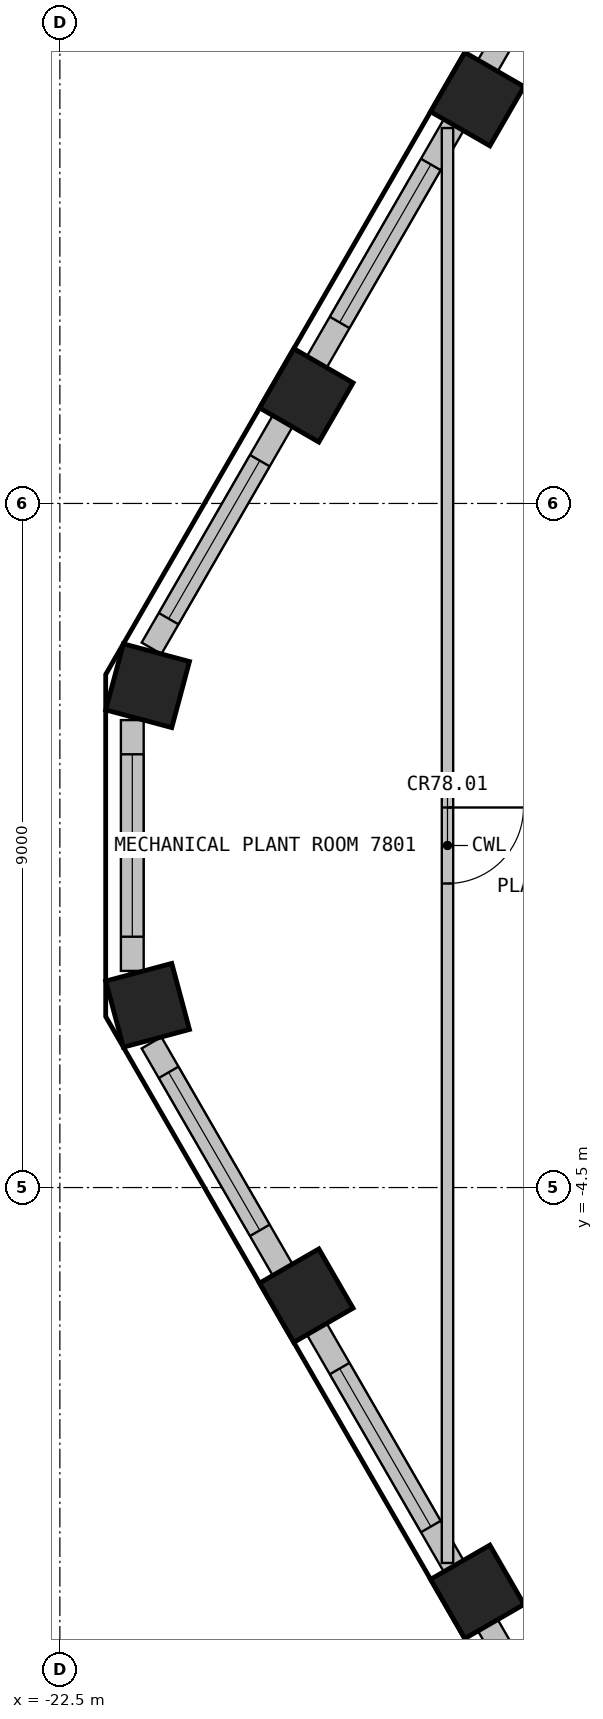
"""IFC4 building model, lengths in metres.
Left out: names, types, materials, properties, quantities, classifications, styles, units other than length and angle.
Written with IfcOpenShell. Run it as: python <this file> out.ifc"""

import sys

from ifc_helpers import new_model, si_unit, direction, frame, frame_2d, origin, origin_2d, place, context, subcontext, project, spatial, rectangle, extrude, element, fill, save


model = new_model("IFC4")
c1 = context("Model", 3, precision=1e-05, world=origin(), true_north=direction((0.0, 1.0)))
c2 = subcontext(c1, "Body", "Model", "MODEL_VIEW")
j1 = project(units=[si_unit("LENGTHUNIT", "METRE"), si_unit("PLANEANGLEUNIT", "RADIAN")], contexts=[c1])
p1 = place(None, origin())
s1 = spatial("IfcSite", under=j1, at=p1, CompositionType="ELEMENT")
p2 = place(p1, origin())
s2 = spatial("IfcBuilding", under=s1, at=p2, CompositionType="ELEMENT")
p3 = place(p2, frame((0.0, 0.0, 318.9)))
s3 = spatial("IfcBuildingStorey", under=s2, at=p3, CompositionType="ELEMENT", Elevation=318.9)
for number, where, z_axis, x_axis in (
    (1, (-17.007, 9.819, 0.0), (0.0, 0.0, 1.0), (-0.5, -0.866, 0.0)),
    (2, (-19.257, 5.922, 0.0), (0.0, 0.0, 1.0), (-0.5, -0.866, 0.0)),
    (3, (-21.346, 2.102, 0.0), (0.0, 0.0, 1.0), (-0.259, -0.966, 0.0)),
    (4, (-21.346, -2.102, 0.0), (0.0, 0.0, 1.0), (0.259, -0.966, 0.0)),
    (5, (-19.257, -5.922, 0.0), (0.0, 0.0, 1.0), (0.5, -0.866, 0.0)),
    (6, (-17.007, -9.819, 0.0), (0.0, 0.0, 1.0), (0.5, -0.866, 0.0)),
):
    element("IfcColumn", number, at=place(p3, frame(where, z_axis=z_axis, x_axis=x_axis)), inside=s3, PredefinedType="COLUMN", context=c2, shape_type="SweptSolid", body=[
        extrude(rectangle(XDim=0.9, YDim=0.9, at=origin_2d()), origin(), (0.0, 0.0, 1.0), 3.6),
    ])
p4 = place(p3, frame((-15.144, 13.247, 0.0), z_axis=(0.0, 0.0, 1.0), x_axis=(-0.500059425018, -0.865991092016, 0.0)))
e7 = element("IfcWall", 7, at=p4, inside=s3, PredefinedType="SOLIDWALL", context=c2, shape_type="SweptSolid", body=[
    extrude(rectangle(XDim=3.449, YDim=0.3, at=frame_2d((1.725, 0.0))), origin(), (0.0, 0.0, 1.0), 4.05),
])
p5 = place(p4, frame((0.45, 0.0, 0.6)))
e8 = element("IfcOpeningElement", 8, at=p5, cuts=e7, PredefinedType="OPENING", context=c2, shape_type="SweptSolid", body=[
    extrude(rectangle(XDim=2.4, YDim=2.3, at=frame_2d((1.2, 1.15))), frame((0.0, 0.16, 0.0), z_axis=(0.0, -1.0, 0.0), x_axis=(1.0, 0.0, 0.0)), (0.0, 0.0, 1.0), 0.32),
])
p6 = place(p3, frame((-17.319, 9.479, 0.0), z_axis=(0.0, 0.0, 1.0), x_axis=(-0.500027802648, -0.866009351323, 0.0)))
e9 = element("IfcWall", 9, at=p6, inside=s3, PredefinedType="SOLIDWALL", context=c2, shape_type="SweptSolid", body=[
    extrude(rectangle(XDim=3.599, YDim=0.3, at=frame_2d((1.799, 0.0))), origin(), (0.0, 0.0, 1.0), 4.05),
])
p7 = place(p6, frame((0.6, 0.0, 0.6)))
e10 = element("IfcOpeningElement", 10, at=p7, cuts=e9, PredefinedType="OPENING", context=c2, shape_type="SweptSolid", body=[
    extrude(rectangle(XDim=2.4, YDim=2.3, at=frame_2d((1.2, 1.15))), frame((0.0, 0.16, 0.0), z_axis=(0.0, -1.0, 0.0), x_axis=(1.0, 0.0, 0.0)), (0.0, 0.0, 1.0), 0.32),
])
p8 = place(p3, frame((-19.569, 5.582, 0.0), z_axis=(0.0, 0.0, 1.0), x_axis=(-0.499975693202, -0.866039436866, 0.0)))
e11 = element("IfcWall", 11, at=p8, inside=s3, PredefinedType="SOLIDWALL", context=c2, shape_type="SweptSolid", body=[
    extrude(rectangle(XDim=3.449, YDim=0.3, at=frame_2d((1.725, 0.0))), origin(), (0.0, 0.0, 1.0), 4.05),
])
p9 = place(p8, frame((0.6, 0.0, 0.6)))
e12 = element("IfcOpeningElement", 12, at=p9, cuts=e11, PredefinedType="OPENING", context=c2, shape_type="SweptSolid", body=[
    extrude(rectangle(XDim=2.4, YDim=2.3, at=frame_2d((1.2, 1.15))), frame((0.0, 0.16, 0.0), z_axis=(0.0, -1.0, 0.0), x_axis=(1.0, 0.0, 0.0)), (0.0, 0.0, 1.0), 0.32),
])
p10 = place(p3, frame((-21.547, 1.65, 0.0), z_axis=(0.0, 0.0, 1.0), x_axis=(0.0, -1.0, 0.0)))
e13 = element("IfcWall", 13, at=p10, inside=s3, PredefinedType="SOLIDWALL", context=c2, shape_type="SweptSolid", body=[
    extrude(rectangle(XDim=3.3, YDim=0.3, at=frame_2d((1.65, 0.0))), origin(), (0.0, 0.0, 1.0), 4.05),
])
p11 = place(p10, frame((0.45, 0.0, 0.6)))
e14 = element("IfcOpeningElement", 14, at=p11, cuts=e13, PredefinedType="OPENING", context=c2, shape_type="SweptSolid", body=[
    extrude(rectangle(XDim=2.4, YDim=2.3, at=frame_2d((1.2, 1.15))), frame((0.0, 0.16, 0.0), z_axis=(0.0, -1.0, 0.0), x_axis=(1.0, 0.0, 0.0)), (0.0, 0.0, 1.0), 0.32),
])
p12 = place(p3, frame((-21.294, -2.595, 0.0), z_axis=(0.0, 0.0, 1.0), x_axis=(0.499975693202, -0.866039436866, 0.0)))
e15 = element("IfcWall", 15, at=p12, inside=s3, PredefinedType="SOLIDWALL", context=c2, shape_type="SweptSolid", body=[
    extrude(rectangle(XDim=3.449, YDim=0.3, at=frame_2d((1.725, 0.0))), origin(), (0.0, 0.0, 1.0), 4.05),
])
p13 = place(p12, frame((0.45, 0.0, 0.6)))
e16 = element("IfcOpeningElement", 16, at=p13, cuts=e15, PredefinedType="OPENING", context=c2, shape_type="SweptSolid", body=[
    extrude(rectangle(XDim=2.4, YDim=2.3, at=frame_2d((1.2, 1.15))), frame((0.0, 0.16, 0.0), z_axis=(0.0, -1.0, 0.0), x_axis=(1.0, 0.0, 0.0)), (0.0, 0.0, 1.0), 0.32),
])
p14 = place(p3, frame((-19.119, -6.362, 0.0), z_axis=(0.0, 0.0, 1.0), x_axis=(0.500027802648, -0.866009351323, 0.0)))
e17 = element("IfcWall", 17, at=p14, inside=s3, PredefinedType="SOLIDWALL", context=c2, shape_type="SweptSolid", body=[
    extrude(rectangle(XDim=3.599, YDim=0.3, at=frame_2d((1.799, 0.0))), origin(), (0.0, 0.0, 1.0), 4.05),
])
p15 = place(p14, frame((0.6, 0.0, 0.6)))
e18 = element("IfcOpeningElement", 18, at=p15, cuts=e17, PredefinedType="OPENING", context=c2, shape_type="SweptSolid", body=[
    extrude(rectangle(XDim=2.4, YDim=2.3, at=frame_2d((1.2, 1.15))), frame((0.0, 0.16, 0.0), z_axis=(0.0, -1.0, 0.0), x_axis=(1.0, 0.0, 0.0)), (0.0, 0.0, 1.0), 0.32),
])
p16 = place(p3, frame((-16.869, -10.26, 0.0), z_axis=(0.0, 0.0, 1.0), x_axis=(0.500059425018, -0.865991092016, 0.0)))
e19 = element("IfcWall", 19, at=p16, inside=s3, PredefinedType="SOLIDWALL", context=c2, shape_type="SweptSolid", body=[
    extrude(rectangle(XDim=3.449, YDim=0.3, at=frame_2d((1.725, 0.0))), origin(), (0.0, 0.0, 1.0), 4.05),
])
p17 = place(p16, frame((0.6, 0.0, 0.6)))
e20 = element("IfcOpeningElement", 20, at=p17, cuts=e19, PredefinedType="OPENING", context=c2, shape_type="SweptSolid", body=[
    extrude(rectangle(XDim=2.4, YDim=2.3, at=frame_2d((1.2, 1.15))), frame((0.0, 0.16, 0.0), z_axis=(0.0, -1.0, 0.0), x_axis=(1.0, 0.0, 0.0)), (0.0, 0.0, 1.0), 0.32),
])
p18 = place(p3, frame((-17.4, 9.439, 0.0), z_axis=(0.0, 0.0, 1.0), x_axis=(0.0, -1.0, 0.0)))
e21 = element("IfcWall", 21, at=p18, inside=s3, PredefinedType="PARTITIONING", context=c2, shape_type="SweptSolid", body=[
    extrude(rectangle(XDim=18.878, YDim=0.15, at=frame_2d((9.439, 0.0))), origin(), (0.0, 0.0, 1.0), 3.6),
])
p19 = place(p18, frame((8.939, 0.0, 0.0)))
e22 = element("IfcOpeningElement", 22, at=p19, cuts=e21, PredefinedType="OPENING", context=c2, shape_type="SweptSolid", body=[
    extrude(rectangle(XDim=1.0, YDim=2.1, at=frame_2d((0.5, 1.05))), frame((0.0, 0.085, 0.0), z_axis=(0.0, -1.0, 0.0), x_axis=(1.0, 0.0, 0.0)), (0.0, 0.0, 1.0), 0.17),
])
p20 = place(p7, origin())
e23 = element("IfcWindow", 23, at=p20, inside=s3, PartitioningType="SINGLE_PANEL", PredefinedType="WINDOW", context=c2, shape_type="SweptSolid", body=[
    extrude(rectangle(XDim=2.4, YDim=2.3, at=frame_2d((1.2, 1.15))), frame((0.0, 0.03, 0.0), z_axis=(0.0, -1.0, 0.0), x_axis=(1.0, 0.0, 0.0)), (0.0, 0.0, 1.0), 0.06),
])
fill(e10, e23)
p21 = place(p9, origin())
e24 = element("IfcWindow", 24, at=p21, inside=s3, PartitioningType="SINGLE_PANEL", PredefinedType="WINDOW", context=c2, shape_type="SweptSolid", body=[
    extrude(rectangle(XDim=2.4, YDim=2.3, at=frame_2d((1.2, 1.15))), frame((0.0, 0.03, 0.0), z_axis=(0.0, -1.0, 0.0), x_axis=(1.0, 0.0, 0.0)), (0.0, 0.0, 1.0), 0.06),
])
fill(e12, e24)
p22 = place(p11, origin())
e25 = element("IfcWindow", 25, at=p22, inside=s3, PartitioningType="SINGLE_PANEL", PredefinedType="WINDOW", context=c2, shape_type="SweptSolid", body=[
    extrude(rectangle(XDim=2.4, YDim=2.3, at=frame_2d((1.2, 1.15))), frame((0.0, 0.03, 0.0), z_axis=(0.0, -1.0, 0.0), x_axis=(1.0, 0.0, 0.0)), (0.0, 0.0, 1.0), 0.06),
])
fill(e14, e25)
p23 = place(p13, origin())
e26 = element("IfcWindow", 26, at=p23, inside=s3, PartitioningType="SINGLE_PANEL", PredefinedType="WINDOW", context=c2, shape_type="SweptSolid", body=[
    extrude(rectangle(XDim=2.4, YDim=2.3, at=frame_2d((1.2, 1.15))), frame((0.0, 0.03, 0.0), z_axis=(0.0, -1.0, 0.0), x_axis=(1.0, 0.0, 0.0)), (0.0, 0.0, 1.0), 0.06),
])
fill(e16, e26)
p24 = place(p15, origin())
e27 = element("IfcWindow", 27, at=p24, inside=s3, PartitioningType="SINGLE_PANEL", PredefinedType="WINDOW", context=c2, shape_type="SweptSolid", body=[
    extrude(rectangle(XDim=2.4, YDim=2.3, at=frame_2d((1.2, 1.15))), frame((0.0, 0.03, 0.0), z_axis=(0.0, -1.0, 0.0), x_axis=(1.0, 0.0, 0.0)), (0.0, 0.0, 1.0), 0.06),
])
fill(e18, e27)
p25 = place(p19, origin())
e28 = element("IfcDoor", 28, at=p25, inside=s3, OperationType="SINGLE_SWING_RIGHT", PredefinedType="DOOR", context=c2, shape_type="SweptSolid", body=[
    extrude(rectangle(XDim=1.0, YDim=2.1, at=frame_2d((0.5, 1.05))), frame((0.0, 0.025, 0.0), z_axis=(0.0, -1.0, 0.0), x_axis=(1.0, 0.0, 0.0)), (0.0, 0.0, 1.0), 0.05),
])
fill(e22, e28)
save(model, sys.argv[1])
